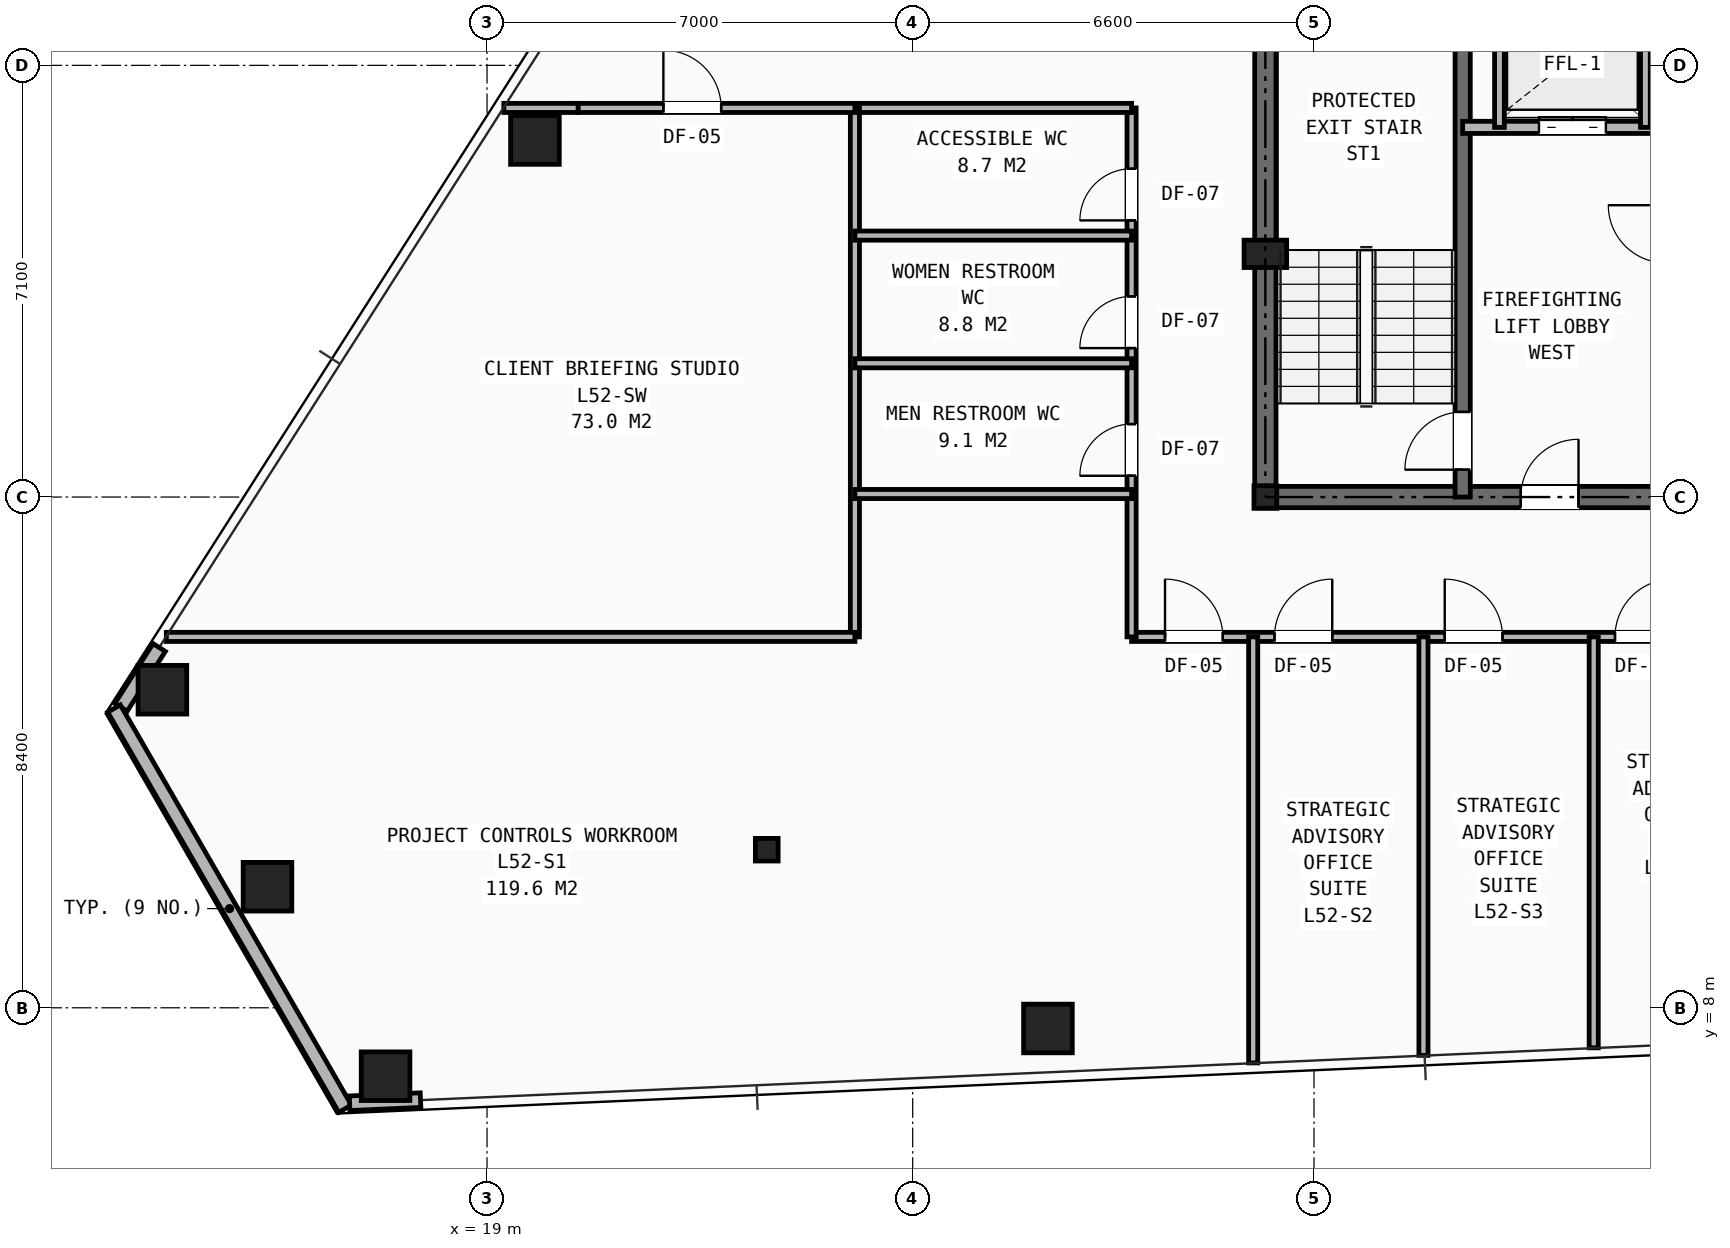
"""IFC4 building model, lengths in metres.
Left out: names, types, materials, properties, quantities, classifications, styles, units other than length and angle.
Written with IfcOpenShell. Run it as: python <this file> out.ifc"""

import sys

from ifc_helpers import new_model, si_unit, direction, frame, frame_2d, origin, origin_2d, place, context, subcontext, project, spatial, rectangle, hollow_rectangle, i_section, extrude, element, fill, save


model = new_model("IFC4")
c1 = context("Model", 3, precision=1e-05, world=origin(), true_north=direction((0.0, 1.0)))
c2 = subcontext(c1, "Body", "Model", "MODEL_VIEW")
j1 = project(units=[si_unit("LENGTHUNIT", "METRE"), si_unit("PLANEANGLEUNIT", "RADIAN")], contexts=[c1])
p1 = place(None, origin())
s1 = spatial("IfcSite", under=j1, at=p1, CompositionType="ELEMENT")
p2 = place(p1, origin())
s2 = spatial("IfcBuilding", under=s1, at=p2, CompositionType="ELEMENT")
p3 = place(p2, frame((0.0, 0.0, 182.7)))
s3 = spatial("IfcBuildingStorey", under=s2, at=p3, CompositionType="ELEMENT", Elevation=182.7)
for number, where, z_axis, x_axis in (
    (1, (31.8, 16.4, 0.0), (0.0, 0.0, 1.0), (1.0, 0.0, 0.0)),
    (2, (23.6, 10.6, 0.0), (0.0, 0.0, 1.0), (1.0, 0.0, 0.0)),
):
    element("IfcColumn", number, at=place(p3, frame(where, z_axis=z_axis, x_axis=x_axis)), inside=s3, PredefinedType="COLUMN", context=c2, shape_type="SweptSolid", body=[
        extrude(i_section(OverallWidth=0.374, OverallDepth=0.372, WebThickness=0.016, FlangeThickness=0.026, at=origin_2d()), origin(), (0.0, 0.0, 1.0), 3.45),
    ])
p4 = place(p3, frame((31.8, 20.4, 0.0), z_axis=(0.0, 0.0, 1.0), x_axis=(1.0, 0.0, 0.0)))
e3 = element("IfcColumn", 3, at=p4, inside=s3, PredefinedType="PILASTER", context=c2, shape_type="SweptSolid", body=[
    extrude(rectangle(XDim=0.7, YDim=0.45, at=origin_2d()), origin(), (0.0, 0.0, 1.0), 3.45),
])
for number, where, z_axis, x_axis in (
    (4, (19.788, 22.272, 0.0), (0.0, 0.0, 1.0), (1.0, 0.0, 0.0)),
    (5, (13.661, 13.231, 0.0), (0.0, 0.0, 1.0), (1.0, 0.0, 0.0)),
    (6, (15.389, 9.991, 0.0), (0.0, 0.0, 1.0), (1.0, 0.0, 0.0)),
    (7, (17.331, 6.875, 0.0), (0.0, 0.0, 1.0), (1.0, 0.0, 0.0)),
    (8, (28.225, 7.659, 0.0), (0.0, 0.0, 1.0), (1.0, 0.0, 0.0)),
):
    element("IfcColumn", number, at=place(p3, frame(where, z_axis=z_axis, x_axis=x_axis)), inside=s3, PredefinedType="COLUMN", context=c2, shape_type="SweptSolid", body=[
        extrude(hollow_rectangle(XDim=0.8, YDim=0.8, WallThickness=0.055, at=origin_2d()), origin(), (0.0, 0.0, 1.0), 3.45),
    ])
p5 = place(p3, frame((13.608, 13.925, 0.0), z_axis=(0.0, 0.0, 1.0), x_axis=(-0.537890013748, -0.843015025435, 0.0)))
e9 = element("IfcWall", 9, at=p5, inside=s3, PredefinedType="SHEAR", context=c2, shape_type="SweptSolid", body=[
    extrude(rectangle(XDim=1.167, YDim=0.24, at=frame_2d((0.584, 0.0))), origin(), (0.0, 0.0, 1.0), 2.583),
])
p6 = place(p3, frame((16.666, 6.34, 0.0), z_axis=(0.0, 0.0, 1.0), x_axis=(-0.500005158081, 0.866022425744, 0.0)))
e10 = element("IfcWall", 10, at=p6, inside=s3, PredefinedType="SHEAR", context=c2, shape_type="SweptSolid", body=[
    extrude(rectangle(XDim=7.6, YDim=0.24, at=frame_2d((3.8, 0.0))), origin(), (0.0, 0.0, 1.0), 2.583),
])
p7 = place(p3, frame((16.74, 6.43, 0.0), z_axis=(0.0, 0.0, 1.0), x_axis=(0.999025931447, 0.04412695657, 0.0)))
e11 = element("IfcWall", 11, at=p7, inside=s3, PredefinedType="SHEAR", context=c2, shape_type="SweptSolid", body=[
    extrude(rectangle(XDim=1.167, YDim=0.24, at=frame_2d((0.584, 0.0))), origin(), (0.0, 0.0, 1.0), 2.583),
])
p8 = place(p3, frame((31.8, 16.4, 0.0), z_axis=(0.0, 0.0, 1.0), x_axis=(1.0, 0.0, 0.0)))
e12 = element("IfcWall", 12, at=p8, inside=s3, PredefinedType="SHEAR", context=c2, shape_type="SweptSolid", body=[
    extrude(rectangle(XDim=16.4, YDim=0.35, at=frame_2d((8.2, 0.0))), origin(), (0.0, 0.0, 1.0), 3.21),
])
p9 = place(p8, frame((7.75, 0.0, 0.0)))
e13 = element("IfcOpeningElement", 13, at=p9, cuts=e12, PredefinedType="OPENING", context=c2, shape_type="SweptSolid", body=[
    extrude(rectangle(XDim=0.9, YDim=2.1, at=frame_2d((0.45, 1.05))), frame((0.0, 0.185, 0.0), z_axis=(0.0, -1.0, 0.0), x_axis=(1.0, 0.0, 0.0)), (0.0, 0.0, 1.0), 0.37),
])
p10 = place(p8, frame((4.2, 0.0, 0.0)))
e14 = element("IfcOpeningElement", 14, at=p10, cuts=e12, PredefinedType="OPENING", context=c2, shape_type="SweptSolid", body=[
    extrude(rectangle(XDim=0.95, YDim=2.1, at=frame_2d((0.475, 1.05))), frame((0.0, 0.185, 0.0), z_axis=(0.0, -1.0, 0.0), x_axis=(1.0, 0.0, 0.0)), (0.0, 0.0, 1.0), 0.37),
])
p11 = place(p8, frame((10.6, 0.0, 0.0)))
e15 = element("IfcOpeningElement", 15, at=p11, cuts=e12, PredefinedType="OPENING", context=c2, shape_type="SweptSolid", body=[
    extrude(rectangle(XDim=0.95, YDim=2.1, at=frame_2d((0.475, 1.05))), frame((0.0, 0.185, 0.0), z_axis=(0.0, -1.0, 0.0), x_axis=(1.0, 0.0, 0.0)), (0.0, 0.0, 1.0), 0.37),
])
p12 = place(p3, frame((31.8, 16.4, 0.0), z_axis=(0.0, 0.0, 1.0), x_axis=(0.0, 1.0, 0.0)))
e16 = element("IfcWall", 16, at=p12, inside=s3, PredefinedType="SHEAR", context=c2, shape_type="SweptSolid", body=[
    extrude(rectangle(XDim=14.8, YDim=0.35, at=frame_2d((7.4, 0.0))), origin(), (0.0, 0.0, 1.0), 3.21),
])
p13 = place(p12, frame((11.0, 0.0, 0.0)))
e17 = element("IfcOpeningElement", 17, at=p13, cuts=e16, PredefinedType="OPENING", context=c2, shape_type="SweptSolid", body=[
    extrude(rectangle(XDim=1.1, YDim=2.15, at=frame_2d((0.55, 1.075))), frame((0.0, 0.185, 0.0), z_axis=(0.0, -1.0, 0.0), x_axis=(1.0, 0.0, 0.0)), (0.0, 0.0, 1.0), 0.37),
])
p14 = place(p3, frame((35.045, 16.4, 0.0), z_axis=(0.0, 0.0, 1.0), x_axis=(0.0, 1.0, 0.0)))
e18 = element("IfcWall", 18, at=p14, inside=s3, PredefinedType="SHEAR", context=c2, shape_type="SweptSolid", body=[
    extrude(rectangle(XDim=8.4, YDim=0.25, at=frame_2d((4.2, 0.0))), origin(), (0.0, 0.0, 1.0), 3.21),
])
p15 = place(p14, frame((0.45, 0.0, 0.0)))
e19 = element("IfcOpeningElement", 19, at=p15, cuts=e18, PredefinedType="OPENING", context=c2, shape_type="SweptSolid", body=[
    extrude(rectangle(XDim=0.95, YDim=2.1, at=frame_2d((0.475, 1.05))), frame((0.0, 0.135, 0.0), z_axis=(0.0, -1.0, 0.0), x_axis=(1.0, 0.0, 0.0)), (0.0, 0.0, 1.0), 0.27),
])
p16 = place(p3, frame((35.045, 22.48, 0.0), z_axis=(0.0, 0.0, 1.0), x_axis=(1.0, 0.0, 0.0)))
e20 = element("IfcWall", 20, at=p16, inside=s3, PredefinedType="SOLIDWALL", context=c2, shape_type="SweptSolid", body=[
    extrude(rectangle(XDim=9.91, YDim=0.2, at=frame_2d((4.955, 0.0))), origin(), (0.0, 0.0, 1.0), 3.21),
])
p17 = place(p16, frame((1.255, 0.0, 0.0)))
e21 = element("IfcOpeningElement", 21, at=p17, cuts=e20, PredefinedType="OPENING", context=c2, shape_type="SweptSolid", body=[
    extrude(rectangle(XDim=1.1, YDim=2.15, at=frame_2d((0.55, 1.075))), frame((0.0, 0.11, 0.0), z_axis=(0.0, -1.0, 0.0), x_axis=(1.0, 0.0, 0.0)), (0.0, 0.0, 1.0), 0.22),
])
p18 = place(p16, frame((7.555, 0.0, 0.0)))
e22 = element("IfcOpeningElement", 22, at=p18, cuts=e20, PredefinedType="OPENING", context=c2, shape_type="SweptSolid", body=[
    extrude(rectangle(XDim=1.1, YDim=2.15, at=frame_2d((0.55, 1.075))), frame((0.0, 0.11, 0.0), z_axis=(0.0, -1.0, 0.0), x_axis=(1.0, 0.0, 0.0)), (0.0, 0.0, 1.0), 0.22),
])
p19 = place(p16, frame((4.405, 0.0, 0.0)))
e23 = element("IfcOpeningElement", 23, at=p19, cuts=e20, PredefinedType="OPENING", context=c2, shape_type="SweptSolid", body=[
    extrude(rectangle(XDim=1.1, YDim=2.15, at=frame_2d((0.55, 1.075))), frame((0.0, 0.11, 0.0), z_axis=(0.0, -1.0, 0.0), x_axis=(1.0, 0.0, 0.0)), (0.0, 0.0, 1.0), 0.22),
])
for number, where, z_axis, x_axis in (
    (24, (35.65, 22.48, 0.0), (0.0, 0.0, 1.0), (0.0, 1.0, 0.0)),
    (25, (38.05, 22.48, 0.0), (0.0, 0.0, 1.0), (0.0, 1.0, 0.0)),
):
    element("IfcWall", number, at=place(p3, frame(where, z_axis=z_axis, x_axis=x_axis)), inside=s3, PredefinedType="SOLIDWALL", context=c2, shape_type="SweptSolid", body=[
        extrude(rectangle(XDim=2.32, YDim=0.16, at=frame_2d((1.16, 0.0))), origin(), (0.0, 0.0, 1.0), 3.21),
    ])
p20 = place(p3, frame((29.6, 14.1, 0.0), z_axis=(0.0, 0.0, 1.0), x_axis=(1.0, 0.0, 0.0)))
e26 = element("IfcWall", 26, at=p20, inside=s3, PredefinedType="PARTITIONING", context=c2, shape_type="SweptSolid", body=[
    extrude(rectangle(XDim=18.6, YDim=0.15, at=frame_2d((9.3, 0.0))), origin(), (0.0, 0.0, 1.0), 2.252),
])
p21 = place(p20, frame((0.55, 0.0, 0.0)))
e27 = element("IfcOpeningElement", 27, at=p21, cuts=e26, PredefinedType="OPENING", context=c2, shape_type="SweptSolid", body=[
    extrude(rectangle(XDim=0.95, YDim=2.1, at=frame_2d((0.475, 1.05))), frame((0.0, 0.085, 0.0), z_axis=(0.0, -1.0, 0.0), x_axis=(1.0, 0.0, 0.0)), (0.0, 0.0, 1.0), 0.17),
])
p22 = place(p20, frame((2.35, 0.0, 0.0)))
e28 = element("IfcOpeningElement", 28, at=p22, cuts=e26, PredefinedType="OPENING", context=c2, shape_type="SweptSolid", body=[
    extrude(rectangle(XDim=0.95, YDim=2.1, at=frame_2d((0.475, 1.05))), frame((0.0, 0.085, 0.0), z_axis=(0.0, -1.0, 0.0), x_axis=(1.0, 0.0, 0.0)), (0.0, 0.0, 1.0), 0.17),
])
p23 = place(p20, frame((5.15, 0.0, 0.0)))
e29 = element("IfcOpeningElement", 29, at=p23, cuts=e26, PredefinedType="OPENING", context=c2, shape_type="SweptSolid", body=[
    extrude(rectangle(XDim=0.95, YDim=2.1, at=frame_2d((0.475, 1.05))), frame((0.0, 0.085, 0.0), z_axis=(0.0, -1.0, 0.0), x_axis=(1.0, 0.0, 0.0)), (0.0, 0.0, 1.0), 0.17),
])
p24 = place(p20, frame((7.95, 0.0, 0.0)))
e30 = element("IfcOpeningElement", 30, at=p24, cuts=e26, PredefinedType="OPENING", context=c2, shape_type="SweptSolid", body=[
    extrude(rectangle(XDim=0.95, YDim=2.1, at=frame_2d((0.475, 1.05))), frame((0.0, 0.085, 0.0), z_axis=(0.0, -1.0, 0.0), x_axis=(1.0, 0.0, 0.0)), (0.0, 0.0, 1.0), 0.17),
])
p25 = place(p20, frame((10.75, 0.0, 0.0)))
e31 = element("IfcOpeningElement", 31, at=p25, cuts=e26, PredefinedType="OPENING", context=c2, shape_type="SweptSolid", body=[
    extrude(rectangle(XDim=0.95, YDim=2.1, at=frame_2d((0.475, 1.05))), frame((0.0, 0.085, 0.0), z_axis=(0.0, -1.0, 0.0), x_axis=(1.0, 0.0, 0.0)), (0.0, 0.0, 1.0), 0.17),
])
p26 = place(p20, frame((13.55, 0.0, 0.0)))
e32 = element("IfcOpeningElement", 32, at=p26, cuts=e26, PredefinedType="OPENING", context=c2, shape_type="SweptSolid", body=[
    extrude(rectangle(XDim=0.95, YDim=2.1, at=frame_2d((0.475, 1.05))), frame((0.0, 0.085, 0.0), z_axis=(0.0, -1.0, 0.0), x_axis=(1.0, 0.0, 0.0)), (0.0, 0.0, 1.0), 0.17),
])
p27 = place(p20, frame((16.35, 0.0, 0.0)))
e33 = element("IfcOpeningElement", 33, at=p27, cuts=e26, PredefinedType="OPENING", context=c2, shape_type="SweptSolid", body=[
    extrude(rectangle(XDim=0.95, YDim=2.1, at=frame_2d((0.475, 1.05))), frame((0.0, 0.085, 0.0), z_axis=(0.0, -1.0, 0.0), x_axis=(1.0, 0.0, 0.0)), (0.0, 0.0, 1.0), 0.17),
])
p28 = place(p3, frame((29.6, 14.1, 0.0), z_axis=(0.0, 0.0, 1.0), x_axis=(0.0, 1.0, 0.0)))
e34 = element("IfcWall", 34, at=p28, inside=s3, PredefinedType="PARTITIONING", context=c2, shape_type="SweptSolid", body=[
    extrude(rectangle(XDim=8.7, YDim=0.15, at=frame_2d((4.35, 0.0))), origin(), (0.0, 0.0, 1.0), 3.21),
])
p29 = place(p28, frame((2.65, 0.0, 0.0)))
e35 = element("IfcOpeningElement", 35, at=p29, cuts=e34, PredefinedType="OPENING", context=c2, shape_type="SweptSolid", body=[
    extrude(rectangle(XDim=0.85, YDim=2.05, at=frame_2d((0.425, 1.025))), frame((0.0, 0.085, 0.0), z_axis=(0.0, -1.0, 0.0), x_axis=(1.0, 0.0, 0.0)), (0.0, 0.0, 1.0), 0.17),
])
p30 = place(p28, frame((4.75, 0.0, 0.0)))
e36 = element("IfcOpeningElement", 36, at=p30, cuts=e34, PredefinedType="OPENING", context=c2, shape_type="SweptSolid", body=[
    extrude(rectangle(XDim=0.85, YDim=2.05, at=frame_2d((0.425, 1.025))), frame((0.0, 0.085, 0.0), z_axis=(0.0, -1.0, 0.0), x_axis=(1.0, 0.0, 0.0)), (0.0, 0.0, 1.0), 0.17),
])
p31 = place(p28, frame((6.85, 0.0, 0.0)))
e37 = element("IfcOpeningElement", 37, at=p31, cuts=e34, PredefinedType="OPENING", context=c2, shape_type="SweptSolid", body=[
    extrude(rectangle(XDim=0.85, YDim=2.05, at=frame_2d((0.425, 1.025))), frame((0.0, 0.085, 0.0), z_axis=(0.0, -1.0, 0.0), x_axis=(1.0, 0.0, 0.0)), (0.0, 0.0, 1.0), 0.17),
])
p32 = place(p3, frame((19.276, 22.8, 0.0), z_axis=(0.0, 0.0, 1.0), x_axis=(1.0, 0.0, 0.0)))
e38 = element("IfcWall", 38, at=p32, inside=s3, PredefinedType="PARTITIONING", context=c2, shape_type="SweptSolid", body=[
    extrude(rectangle(XDim=1.224, YDim=0.15, at=frame_2d((0.612, 0.0))), origin(), (0.0, 0.0, 1.0), 2.589),
])
p33 = place(p3, frame((25.05, 22.8, 0.0), z_axis=(0.0, 0.0, 1.0), x_axis=(1.0, 0.0, 0.0)))
e39 = element("IfcWall", 39, at=p33, inside=s3, PredefinedType="PARTITIONING", context=c2, shape_type="SweptSolid", body=[
    extrude(rectangle(XDim=4.55, YDim=0.15, at=frame_2d((2.275, 0.0))), origin(), (0.0, 0.0, 1.0), 3.21),
])
p34 = place(p3, frame((25.05, 14.1, 0.0), z_axis=(0.0, 0.0, 1.0), x_axis=(0.0, 1.0, 0.0)))
e40 = element("IfcWall", 40, at=p34, inside=s3, PredefinedType="PARTITIONING", context=c2, shape_type="SweptSolid", body=[
    extrude(rectangle(XDim=8.7, YDim=0.15, at=frame_2d((4.35, 0.0))), origin(), (0.0, 0.0, 1.0), 3.21),
])
for number, where, z_axis, x_axis in (
    (41, (25.05, 16.45, 0.0), (0.0, 0.0, 1.0), (1.0, 0.0, 0.0)),
    (42, (25.05, 18.6, 0.0), (0.0, 0.0, 1.0), (1.0, 0.0, 0.0)),
    (43, (25.05, 20.7, 0.0), (0.0, 0.0, 1.0), (1.0, 0.0, 0.0)),
):
    element("IfcWall", number, at=place(p3, frame(where, z_axis=z_axis, x_axis=x_axis)), inside=s3, PredefinedType="PARTITIONING", context=c2, shape_type="SweptSolid", body=[
        extrude(rectangle(XDim=4.55, YDim=0.15, at=frame_2d((2.275, 0.0))), origin(), (0.0, 0.0, 1.0), 3.21),
    ])
p35 = place(p3, frame((31.6, 7.093, 0.0), z_axis=(0.0, 0.0, 1.0), x_axis=(0.0, 1.0, 0.0)))
e44 = element("IfcWall", 44, at=p35, inside=s3, PredefinedType="PARTITIONING", context=c2, shape_type="SweptSolid", body=[
    extrude(rectangle(XDim=7.007, YDim=0.15, at=frame_2d((3.503, 0.0))), origin(), (0.0, 0.0, 1.0), 2.589),
])
p36 = place(p3, frame((34.4, 7.217, 0.0), z_axis=(0.0, 0.0, 1.0), x_axis=(0.0, 1.0, 0.0)))
e45 = element("IfcWall", 45, at=p36, inside=s3, PredefinedType="PARTITIONING", context=c2, shape_type="SweptSolid", body=[
    extrude(rectangle(XDim=6.883, YDim=0.15, at=frame_2d((3.441, 0.0))), origin(), (0.0, 0.0, 1.0), 2.252),
])
p37 = place(p3, frame((37.2, 7.342, 0.0), z_axis=(0.0, 0.0, 1.0), x_axis=(0.0, 1.0, 0.0)))
e46 = element("IfcWall", 46, at=p37, inside=s3, PredefinedType="PARTITIONING", context=c2, shape_type="SweptSolid", body=[
    extrude(rectangle(XDim=6.759, YDim=0.15, at=frame_2d((3.379, 0.0))), origin(), (0.0, 0.0, 1.0), 2.252),
])
p38 = place(p3, frame((13.726, 14.1, 0.0), z_axis=(0.0, 0.0, 1.0), x_axis=(1.0, 0.0, 0.0)))
e47 = element("IfcWall", 47, at=p38, inside=s3, PredefinedType="PARTITIONING", context=c2, shape_type="SweptSolid", body=[
    extrude(rectangle(XDim=11.324, YDim=0.15, at=frame_2d((5.662, 0.0))), origin(), (0.0, 0.0, 1.0), 2.589),
])
p39 = place(p3, frame((20.5, 22.8, 0.0), z_axis=(0.0, 0.0, 1.0), x_axis=(1.0, 0.0, 0.0)))
e48 = element("IfcWall", 48, at=p39, inside=s3, PredefinedType="PARTITIONING", context=c2, shape_type="SweptSolid", body=[
    extrude(rectangle(XDim=4.55, YDim=0.15, at=frame_2d((2.275, 0.0))), origin(), (0.0, 0.0, 1.0), 2.589),
])
p40 = place(p39, frame((1.4, 0.0, 0.0)))
e49 = element("IfcOpeningElement", 49, at=p40, cuts=e48, PredefinedType="OPENING", context=c2, shape_type="SweptSolid", body=[
    extrude(rectangle(XDim=0.95, YDim=2.1, at=frame_2d((0.475, 1.05))), frame((0.0, 0.085, 0.0), z_axis=(0.0, -1.0, 0.0), x_axis=(1.0, 0.0, 0.0)), (0.0, 0.0, 1.0), 0.17),
])
p41 = place(p15, origin())
e50 = element("IfcDoor", 50, at=p41, inside=s3, OperationType="SINGLE_SWING_LEFT", PredefinedType="DOOR", context=c2, shape_type="SweptSolid", body=[
    extrude(rectangle(XDim=0.95, YDim=2.1, at=frame_2d((0.475, 1.05))), frame((0.0, 0.025, 0.0), z_axis=(0.0, -1.0, 0.0), x_axis=(1.0, 0.0, 0.0)), (0.0, 0.0, 1.0), 0.05),
])
fill(e19, e50)
p42 = place(p10, origin())
e51 = element("IfcDoor", 51, at=p42, inside=s3, OperationType="SINGLE_SWING_RIGHT", PredefinedType="DOOR", context=c2, shape_type="SweptSolid", body=[
    extrude(rectangle(XDim=0.95, YDim=2.1, at=frame_2d((0.475, 1.05))), frame((0.0, 0.025, 0.0), z_axis=(0.0, -1.0, 0.0), x_axis=(1.0, 0.0, 0.0)), (0.0, 0.0, 1.0), 0.05),
])
fill(e14, e51)
p43 = place(p17, origin())
e52 = element("IfcDoor", 52, at=p43, inside=s3, OperationType="DOUBLE_DOOR_SLIDING", PredefinedType="DOOR", context=c2, shape_type="SweptSolid", body=[
    extrude(rectangle(XDim=1.1, YDim=2.15, at=frame_2d((0.55, 1.075))), frame((0.0, 0.025, 0.0), z_axis=(0.0, -1.0, 0.0), x_axis=(1.0, 0.0, 0.0)), (0.0, 0.0, 1.0), 0.05),
])
fill(e21, e52)
p44 = place(p29, origin())
e53 = element("IfcDoor", 53, at=p44, inside=s3, OperationType="SINGLE_SWING_LEFT", PredefinedType="DOOR", context=c2, shape_type="SweptSolid", body=[
    extrude(rectangle(XDim=0.85, YDim=2.05, at=frame_2d((0.425, 1.025))), frame((0.0, 0.025, 0.0), z_axis=(0.0, -1.0, 0.0), x_axis=(1.0, 0.0, 0.0)), (0.0, 0.0, 1.0), 0.05),
])
fill(e35, e53)
p45 = place(p30, origin())
e54 = element("IfcDoor", 54, at=p45, inside=s3, OperationType="SINGLE_SWING_LEFT", PredefinedType="DOOR", context=c2, shape_type="SweptSolid", body=[
    extrude(rectangle(XDim=0.85, YDim=2.05, at=frame_2d((0.425, 1.025))), frame((0.0, 0.025, 0.0), z_axis=(0.0, -1.0, 0.0), x_axis=(1.0, 0.0, 0.0)), (0.0, 0.0, 1.0), 0.05),
])
fill(e36, e54)
p46 = place(p31, origin())
e55 = element("IfcDoor", 55, at=p46, inside=s3, OperationType="SINGLE_SWING_LEFT", PredefinedType="DOOR", context=c2, shape_type="SweptSolid", body=[
    extrude(rectangle(XDim=0.85, YDim=2.05, at=frame_2d((0.425, 1.025))), frame((0.0, 0.025, 0.0), z_axis=(0.0, -1.0, 0.0), x_axis=(1.0, 0.0, 0.0)), (0.0, 0.0, 1.0), 0.05),
])
fill(e37, e55)
p47 = place(p21, origin())
e56 = element("IfcDoor", 56, at=p47, inside=s3, OperationType="SINGLE_SWING_LEFT", PredefinedType="DOOR", context=c2, shape_type="SweptSolid", body=[
    extrude(rectangle(XDim=0.95, YDim=2.1, at=frame_2d((0.475, 1.05))), frame((0.0, 0.025, 0.0), z_axis=(0.0, -1.0, 0.0), x_axis=(1.0, 0.0, 0.0)), (0.0, 0.0, 1.0), 0.05),
])
fill(e27, e56)
p48 = place(p22, origin())
e57 = element("IfcDoor", 57, at=p48, inside=s3, OperationType="SINGLE_SWING_RIGHT", PredefinedType="DOOR", context=c2, shape_type="SweptSolid", body=[
    extrude(rectangle(XDim=0.95, YDim=2.1, at=frame_2d((0.475, 1.05))), frame((0.0, 0.025, 0.0), z_axis=(0.0, -1.0, 0.0), x_axis=(1.0, 0.0, 0.0)), (0.0, 0.0, 1.0), 0.05),
])
fill(e28, e57)
p49 = place(p23, origin())
e58 = element("IfcDoor", 58, at=p49, inside=s3, OperationType="SINGLE_SWING_LEFT", PredefinedType="DOOR", context=c2, shape_type="SweptSolid", body=[
    extrude(rectangle(XDim=0.95, YDim=2.1, at=frame_2d((0.475, 1.05))), frame((0.0, 0.025, 0.0), z_axis=(0.0, -1.0, 0.0), x_axis=(1.0, 0.0, 0.0)), (0.0, 0.0, 1.0), 0.05),
])
fill(e29, e58)
p50 = place(p24, origin())
e59 = element("IfcDoor", 59, at=p50, inside=s3, OperationType="SINGLE_SWING_RIGHT", PredefinedType="DOOR", context=c2, shape_type="SweptSolid", body=[
    extrude(rectangle(XDim=0.95, YDim=2.1, at=frame_2d((0.475, 1.05))), frame((0.0, 0.025, 0.0), z_axis=(0.0, -1.0, 0.0), x_axis=(1.0, 0.0, 0.0)), (0.0, 0.0, 1.0), 0.05),
])
fill(e30, e59)
p51 = place(p40, origin())
e60 = element("IfcDoor", 60, at=p51, inside=s3, OperationType="SINGLE_SWING_LEFT", PredefinedType="DOOR", context=c2, shape_type="SweptSolid", body=[
    extrude(rectangle(XDim=0.95, YDim=2.1, at=frame_2d((0.475, 1.05))), frame((0.0, 0.025, 0.0), z_axis=(0.0, -1.0, 0.0), x_axis=(1.0, 0.0, 0.0)), (0.0, 0.0, 1.0), 0.05),
])
fill(e49, e60)
save(model, sys.argv[1])
